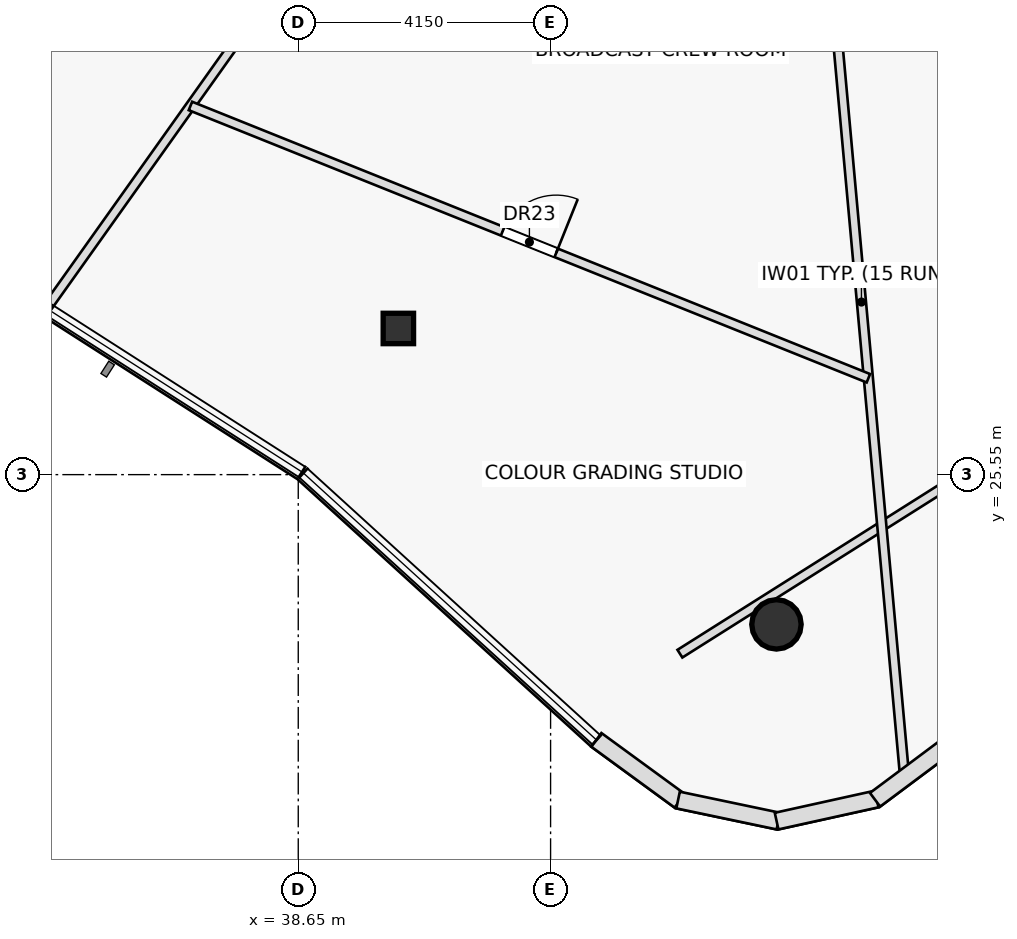
"""IFC4 building model, lengths in metres.
Left out: names, types, materials, properties, quantities, classifications, styles, units other than length and angle.
Written with IfcOpenShell. Run it as: python <this file> out.ifc"""

import sys

from ifc_helpers import new_model, si_unit, direction, frame, frame_2d, origin, origin_2d, place, context, subcontext, project, spatial, rectangle, hollow_rectangle, hollow_circle, extrude, element, fill, save


model = new_model("IFC4")
c1 = context("Model", 3, precision=1e-05, world=origin(), true_north=direction((0.0, 1.0)))
c2 = subcontext(c1, "Body", "Model", "MODEL_VIEW")
j1 = project(units=[si_unit("LENGTHUNIT", "METRE"), si_unit("PLANEANGLEUNIT", "RADIAN")], contexts=[c1])
p1 = place(None, origin())
s1 = spatial("IfcSite", under=j1, at=p1, CompositionType="ELEMENT")
p2 = place(p1, origin())
s2 = spatial("IfcBuilding", under=s1, at=p2, CompositionType="ELEMENT")
p3 = place(p2, frame((0.0, 0.0, 297.5)))
s3 = spatial("IfcBuildingStorey", under=s2, at=p3, CompositionType="ELEMENT", Elevation=297.5)
p4 = place(p3, frame((40.296, 27.954, 0.0), z_axis=(0.0, 0.0, 1.0), x_axis=(1.0, 0.0, 0.0)))
e1 = element("IfcColumn", 1, at=p4, inside=s3, PredefinedType="COLUMN", context=c2, shape_type="SweptSolid", body=[
    extrude(hollow_rectangle(XDim=0.5, YDim=0.5, WallThickness=0.03, at=origin_2d()), origin(), (0.0, 0.0, 1.0), 3.7),
])
p5 = place(p3, frame((46.515, 23.087, 0.0), z_axis=(0.0, 0.0, 1.0), x_axis=(1.0, 0.0, 0.0)))
e2 = element("IfcColumn", 2, at=p5, inside=s3, PredefinedType="COLUMN", context=c2, shape_type="SweptSolid", body=[
    extrude(hollow_circle(Radius=0.406, WallThickness=0.036, at=origin_2d()), origin(), (0.0, 0.0, 1.0), 3.7),
])
p6 = place(p3, frame((44.927, 22.605, 0.0), z_axis=(0.0, 0.0, 1.0), x_axis=(0.845624548895, 0.533778158326, 0.0)))
e3 = element("IfcWall", 3, at=p6, inside=s3, PredefinedType="PARTITIONING", context=c2, shape_type="SweptSolid", body=[
    extrude(rectangle(XDim=10.861, YDim=0.15, at=frame_2d((5.431, 0.0))), origin(), (0.0, 0.0, 1.0), 3.175),
])
p7 = place(p3, frame((40.154, 36.22, 0.0), z_axis=(0.0, 0.0, 1.0), x_axis=(-0.579656851694, -0.814860683973, 0.0)))
e4 = element("IfcWall", 4, at=p7, inside=s3, PredefinedType="PARTITIONING", context=c2, shape_type="SweptSolid", body=[
    extrude(rectangle(XDim=9.748, YDim=0.15, at=frame_2d((4.874, 0.0))), origin(), (0.0, 0.0, 1.0), 3.175),
])
p8 = place(p3, frame((47.199, 36.22, 0.0), z_axis=(0.0, 0.0, 1.0), x_axis=(0.090664502259, -0.995881492965, 0.0)))
e5 = element("IfcWall", 5, at=p8, inside=s3, PredefinedType="PARTITIONING", context=c2, shape_type="SweptSolid", body=[
    extrude(rectangle(XDim=15.729, YDim=0.15, at=frame_2d((7.864, 0.0))), origin(), (0.0, 0.0, 1.0), 3.235),
])
p9 = place(p3, frame((36.877, 31.613, 0.0), z_axis=(0.0, 0.0, 1.0), x_axis=(0.92795166299, -0.372700565003, 0.0)))
e6 = element("IfcWall", 6, at=p9, inside=s3, PredefinedType="PARTITIONING", context=c2, shape_type="SweptSolid", body=[
    extrude(rectangle(XDim=12.015, YDim=0.15, at=frame_2d((6.008, 0.0))), origin(), (0.0, 0.0, 1.0), 3.235),
])
p10 = place(p9, frame((5.532, 0.0, 0.0)))
e7 = element("IfcOpeningElement", 7, at=p10, cuts=e6, PredefinedType="OPENING", context=c2, shape_type="SweptSolid", body=[
    extrude(rectangle(XDim=0.95, YDim=2.05, at=frame_2d((0.475, 1.025))), frame((0.0, 0.085, 0.0), z_axis=(0.0, -1.0, 0.0), x_axis=(1.0, 0.0, 0.0)), (0.0, 0.0, 1.0), 0.17),
])
p11 = place(p3, frame((43.553, 21.188, 0.0), z_axis=(0.0, 0.0, 1.0), x_axis=(0.807496524536, -0.589872327595, 0.0)))
e8 = element("IfcWall", 8, at=p11, inside=s3, PredefinedType="STANDARD", context=c2, shape_type="SweptSolid", body=[
    extrude(rectangle(XDim=1.697, YDim=0.28, at=frame_2d((0.849, 0.0))), origin(), (0.0, 0.0, 1.0), 3.7),
])
p12 = place(p3, frame((44.897, 20.198, 0.0), z_axis=(0.0, 0.0, 1.0), x_axis=(0.978681745031, -0.205382671963, 0.0)))
e9 = element("IfcWall", 9, at=p12, inside=s3, PredefinedType="STANDARD", context=c2, shape_type="SweptSolid", body=[
    extrude(rectangle(XDim=1.686, YDim=0.28, at=frame_2d((0.843, 0.0))), origin(), (0.0, 0.0, 1.0), 3.7),
])
p13 = place(p3, frame((46.517, 19.852, 0.0), z_axis=(0.0, 0.0, 1.0), x_axis=(0.976462344772, 0.215687944128, 0.0)))
e10 = element("IfcWall", 10, at=p13, inside=s3, PredefinedType="STANDARD", context=c2, shape_type="SweptSolid", body=[
    extrude(rectangle(XDim=1.685, YDim=0.28, at=frame_2d((0.843, 0.0))), origin(), (0.0, 0.0, 1.0), 3.7),
])
p14 = place(p3, frame((48.136, 20.204, 0.0), z_axis=(0.0, 0.0, 1.0), x_axis=(0.801267431416, 0.598306362453, 0.0)))
e11 = element("IfcWall", 11, at=p14, inside=s3, PredefinedType="STANDARD", context=c2, shape_type="SweptSolid", body=[
    extrude(rectangle(XDim=1.708, YDim=0.28, at=frame_2d((0.854, 0.0))), origin(), (0.0, 0.0, 1.0), 3.7),
])
p15 = place(p10, origin())
e12 = element("IfcDoor", 12, at=p15, inside=s3, OperationType="SINGLE_SWING_RIGHT", PredefinedType="DOOR", context=c2, shape_type="SweptSolid", body=[
    extrude(rectangle(XDim=0.95, YDim=2.05, at=frame_2d((0.475, 1.025))), frame((0.0, 0.025, 0.0), z_axis=(0.0, -1.0, 0.0), x_axis=(1.0, 0.0, 0.0)), (0.0, 0.0, 1.0), 0.05),
])
fill(e7, e12)
save(model, sys.argv[1])
